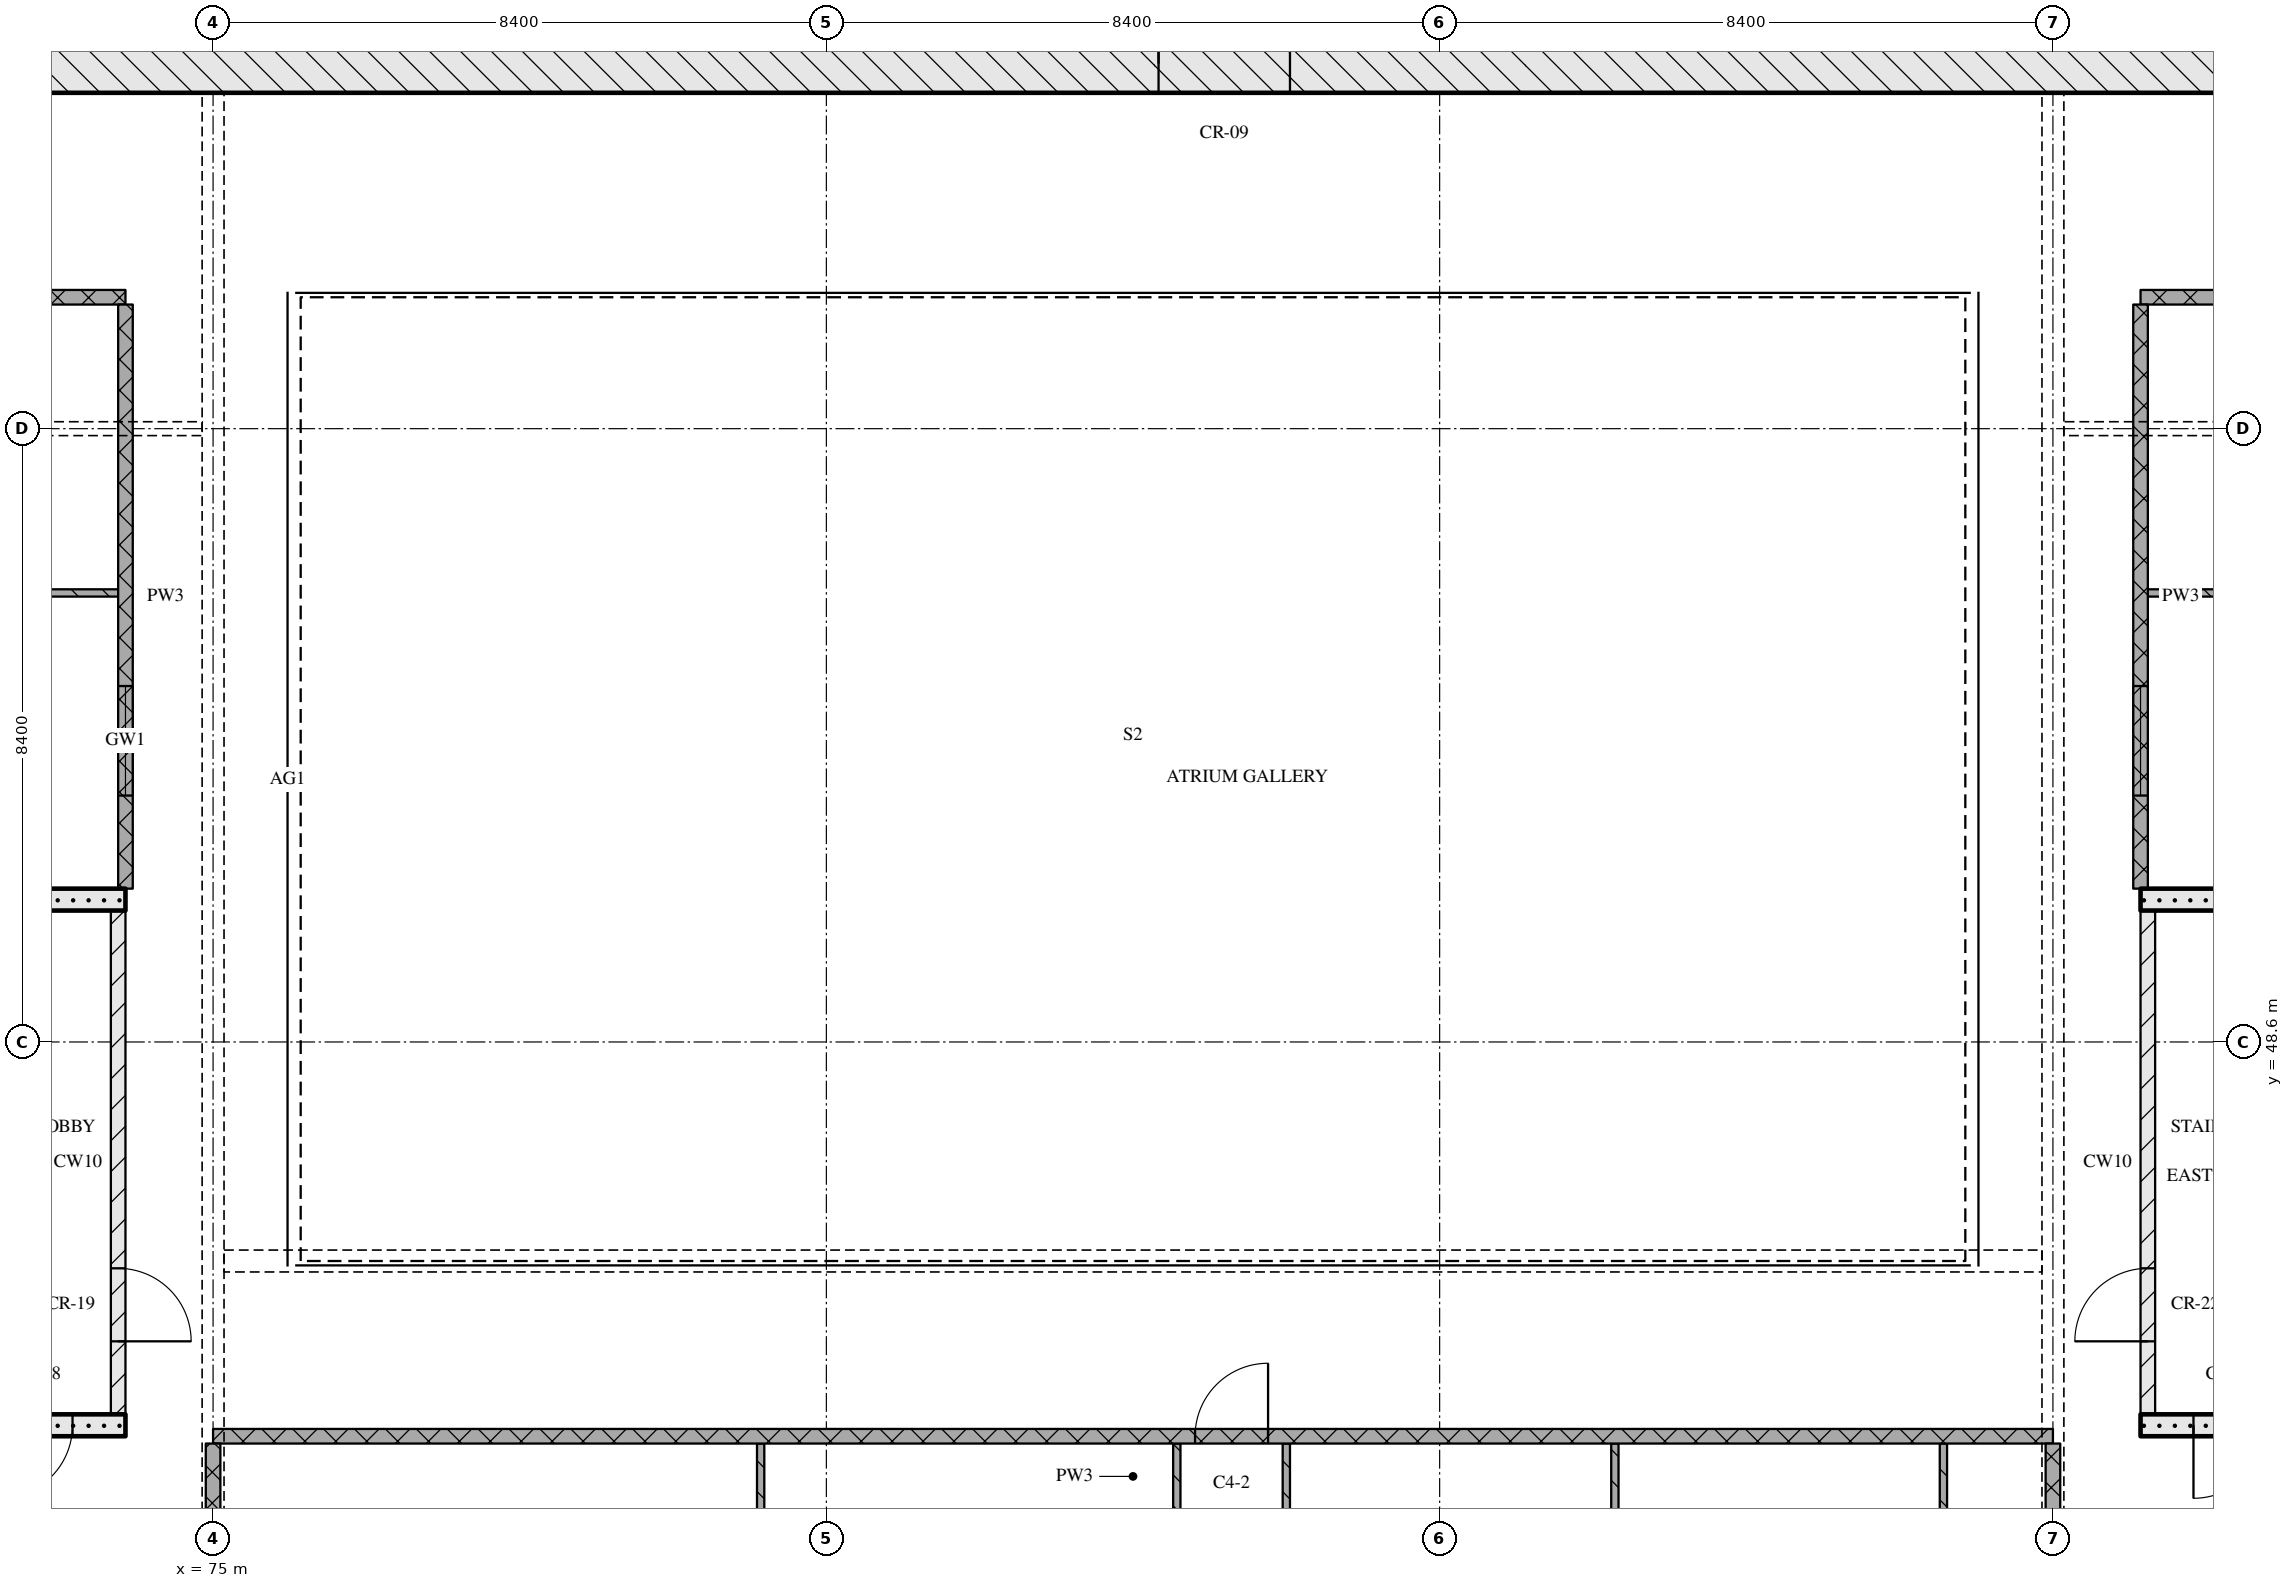
"""IFC4 building model, lengths in metres.
Left out: names, types, materials, properties, quantities, classifications, styles, units other than length and angle.
Written with IfcOpenShell. Run it as: python <this file> out.ifc"""

import sys

from ifc_helpers import new_model, si_unit, direction, frame, frame_2d, origin, place, context, subcontext, project, spatial, rectangle, extrude, element, fill, save


model = new_model("IFC4")
c1 = context("Model", 3, precision=1e-05, world=origin(), true_north=direction((0.0, 1.0)))
c2 = subcontext(c1, "Body", "Model", "MODEL_VIEW")
j1 = project(units=[si_unit("LENGTHUNIT", "METRE"), si_unit("PLANEANGLEUNIT", "RADIAN")], contexts=[c1])
p1 = place(None, origin())
s1 = spatial("IfcSite", under=j1, at=p1, CompositionType="ELEMENT")
p2 = place(p1, origin())
s2 = spatial("IfcBuilding", under=s1, at=p2, CompositionType="ELEMENT")
p3 = place(p2, frame((0.0, 0.0, 187.05)))
s3 = spatial("IfcBuildingStorey", under=s2, at=p3, CompositionType="ELEMENT", Elevation=187.05)
p4 = place(p3, frame((67.0, 62.0, 0.0), z_axis=(0.0, 0.0, 1.0), x_axis=(1.0, 0.0, 0.0)))
e1 = element("IfcWall", 1, at=p4, inside=s3, PredefinedType="SOLIDWALL", context=c2, shape_type="SweptSolid", body=[
    extrude(rectangle(XDim=41.2, YDim=0.8, at=frame_2d((20.6, 0.0))), origin(), (0.0, 0.0, 1.0), 3.32),
])
p5 = place(p4, frame((20.95, 0.0, 0.0)))
e2 = element("IfcOpeningElement", 2, at=p5, cuts=e1, PredefinedType="OPENING", context=c2, shape_type="SweptSolid", body=[
    extrude(rectangle(XDim=1.8, YDim=2.1, at=frame_2d((0.9, 1.05))), frame((0.0, 0.41, 0.0), z_axis=(0.0, -1.0, 0.0), x_axis=(1.0, 0.0, 0.0)), (0.0, 0.0, 1.0), 0.82),
])
p6 = place(p3, frame((68.2, 43.35, 0.0), z_axis=(0.0, 0.0, 1.0), x_axis=(1.0, 0.0, 0.0)))
e3 = element("IfcWall", 3, at=p6, inside=s3, PredefinedType="SOLIDWALL", context=c2, shape_type="SweptSolid", body=[
    extrude(rectangle(XDim=5.6, YDim=0.3, at=frame_2d((2.8, 0.0))), origin(), (0.0, 0.0, 1.0), 3.32),
])
p7 = place(p6, frame((3.875, 0.0, 0.0)))
e4 = element("IfcOpeningElement", 4, at=p7, cuts=e3, PredefinedType="OPENING", context=c2, shape_type="SweptSolid", body=[
    extrude(rectangle(XDim=1.0, YDim=2.1, at=frame_2d((0.5, 1.05))), frame((0.0, 0.16, 0.0), z_axis=(0.0, -1.0, 0.0), x_axis=(1.0, 0.0, 0.0)), (0.0, 0.0, 1.0), 0.32),
])
p8 = place(p3, frame((73.7, 43.5, 0.0), z_axis=(0.0, 0.0, 1.0), x_axis=(0.0, 1.0, 0.0)))
e5 = element("IfcWall", 5, at=p8, inside=s3, PredefinedType="PARTITIONING", context=c2, shape_type="SweptSolid", body=[
    extrude(rectangle(XDim=6.9, YDim=0.2, at=frame_2d((3.45, 0.0))), origin(), (0.0, 0.0, 1.0), 3.32),
])
p9 = place(p8, frame((1.0, 0.0, 0.0)))
e6 = element("IfcOpeningElement", 6, at=p9, cuts=e5, PredefinedType="OPENING", context=c2, shape_type="SweptSolid", body=[
    extrude(rectangle(XDim=1.0, YDim=2.1, at=frame_2d((0.5, 1.05))), frame((0.0, 0.11, 0.0), z_axis=(0.0, -1.0, 0.0), x_axis=(1.0, 0.0, 0.0)), (0.0, 0.0, 1.0), 0.22),
])
p10 = place(p3, frame((68.2, 50.55, 0.0), z_axis=(0.0, 0.0, 1.0), x_axis=(1.0, 0.0, 0.0)))
e7 = element("IfcWall", 7, at=p10, inside=s3, PredefinedType="SOLIDWALL", context=c2, shape_type="SweptSolid", body=[
    extrude(rectangle(XDim=5.6, YDim=0.3, at=frame_2d((2.8, 0.0))), origin(), (0.0, 0.0, 1.0), 3.32),
])
p11 = place(p3, frame((101.4, 43.35, 0.0), z_axis=(0.0, 0.0, 1.0), x_axis=(1.0, 0.0, 0.0)))
e8 = element("IfcWall", 8, at=p11, inside=s3, PredefinedType="SOLIDWALL", context=c2, shape_type="SweptSolid", body=[
    extrude(rectangle(XDim=5.6, YDim=0.3, at=frame_2d((2.8, 0.0))), origin(), (0.0, 0.0, 1.0), 3.32),
])
p12 = place(p11, frame((0.725, 0.0, 0.0)))
e9 = element("IfcOpeningElement", 9, at=p12, cuts=e8, PredefinedType="OPENING", context=c2, shape_type="SweptSolid", body=[
    extrude(rectangle(XDim=1.0, YDim=2.1, at=frame_2d((0.5, 1.05))), frame((0.0, 0.16, 0.0), z_axis=(0.0, -1.0, 0.0), x_axis=(1.0, 0.0, 0.0)), (0.0, 0.0, 1.0), 0.32),
])
p13 = place(p3, frame((101.5, 43.5, 0.0), z_axis=(0.0, 0.0, 1.0), x_axis=(0.0, 1.0, 0.0)))
e10 = element("IfcWall", 10, at=p13, inside=s3, PredefinedType="PARTITIONING", context=c2, shape_type="SweptSolid", body=[
    extrude(rectangle(XDim=6.9, YDim=0.2, at=frame_2d((3.45, 0.0))), origin(), (0.0, 0.0, 1.0), 3.32),
])
p14 = place(p13, frame((1.0, 0.0, 0.0)))
e11 = element("IfcOpeningElement", 11, at=p14, cuts=e10, PredefinedType="OPENING", context=c2, shape_type="SweptSolid", body=[
    extrude(rectangle(XDim=1.0, YDim=2.1, at=frame_2d((0.5, 1.05))), frame((0.0, 0.11, 0.0), z_axis=(0.0, -1.0, 0.0), x_axis=(1.0, 0.0, 0.0)), (0.0, 0.0, 1.0), 0.22),
])
p15 = place(p3, frame((101.4, 50.55, 0.0), z_axis=(0.0, 0.0, 1.0), x_axis=(1.0, 0.0, 0.0)))
e12 = element("IfcWall", 12, at=p15, inside=s3, PredefinedType="SOLIDWALL", context=c2, shape_type="SweptSolid", body=[
    extrude(rectangle(XDim=5.6, YDim=0.3, at=frame_2d((2.8, 0.0))), origin(), (0.0, 0.0, 1.0), 3.32),
])
p16 = place(p3, frame((100.2, 43.2, 0.0), z_axis=(0.0, 0.0, 1.0), x_axis=(-1.0, 0.0, 0.0)))
e13 = element("IfcWall", 13, at=p16, inside=s3, PredefinedType="PARTITIONING", context=c2, shape_type="SweptSolid", body=[
    extrude(rectangle(XDim=25.2, YDim=0.2, at=frame_2d((12.6, 0.0))), origin(), (0.0, 0.0, 1.0), 3.32),
])
p17 = place(p16, frame((10.75, 0.0, 0.0)))
e14 = element("IfcOpeningElement", 14, at=p17, cuts=e13, PredefinedType="OPENING", context=c2, shape_type="SweptSolid", body=[
    extrude(rectangle(XDim=1.0, YDim=2.1, at=frame_2d((0.5, 1.05))), frame((0.0, 0.11, 0.0), z_axis=(0.0, -1.0, 0.0), x_axis=(1.0, 0.0, 0.0)), (0.0, 0.0, 1.0), 0.22),
])
p18 = place(p3, frame((73.7, 54.75, 0.0), z_axis=(0.0, 0.0, 1.0), x_axis=(-1.0, 0.0, 0.0)))
e15 = element("IfcWall", 15, at=p18, inside=s3, PredefinedType="PARTITIONING", context=c2, shape_type="SweptSolid", body=[
    extrude(rectangle(XDim=6.2, YDim=0.1, at=frame_2d((3.1, 0.0))), origin(), (0.0, 0.0, 1.0), 3.32),
])
p19 = place(p18, frame((2.6, 0.0, 0.0)))
e16 = element("IfcOpeningElement", 16, at=p19, cuts=e15, PredefinedType="OPENING", context=c2, shape_type="SweptSolid", body=[
    extrude(rectangle(XDim=0.9, YDim=2.1, at=frame_2d((0.45, 1.05))), frame((0.0, 0.06, 0.0), z_axis=(0.0, -1.0, 0.0), x_axis=(1.0, 0.0, 0.0)), (0.0, 0.0, 1.0), 0.12),
])
p20 = place(p3, frame((101.5, 54.75, 0.0), z_axis=(0.0, 0.0, 1.0), x_axis=(1.0, 0.0, 0.0)))
e17 = element("IfcWall", 17, at=p20, inside=s3, PredefinedType="PARTITIONING", context=c2, shape_type="SweptSolid", body=[
    extrude(rectangle(XDim=6.2, YDim=0.1, at=frame_2d((3.1, 0.0))), origin(), (0.0, 0.0, 1.0), 3.32),
])
p21 = place(p3, frame((63.0, 58.8, 0.0), z_axis=(0.0, 0.0, 1.0), x_axis=(1.0, 0.0, 0.0)))
e18 = element("IfcWall", 18, at=p21, inside=s3, PredefinedType="PARTITIONING", context=c2, shape_type="SweptSolid", body=[
    extrude(rectangle(XDim=10.8, YDim=0.2, at=frame_2d((5.4, 0.0))), origin(), (0.0, 0.0, 1.0), 3.32),
])
p22 = place(p3, frame((112.2, 58.8, 0.0), z_axis=(0.0, 0.0, 1.0), x_axis=(-1.0, 0.0, 0.0)))
e19 = element("IfcWall", 19, at=p22, inside=s3, PredefinedType="PARTITIONING", context=c2, shape_type="SweptSolid", body=[
    extrude(rectangle(XDim=10.8, YDim=0.2, at=frame_2d((5.4, 0.0))), origin(), (0.0, 0.0, 1.0), 3.32),
])
p23 = place(p22, frame((2.85, 0.0, 0.0)))
e20 = element("IfcOpeningElement", 20, at=p23, cuts=e19, PredefinedType="OPENING", context=c2, shape_type="SweptSolid", body=[
    extrude(rectangle(XDim=1.0, YDim=2.1, at=frame_2d((0.5, 1.05))), frame((0.0, 0.11, 0.0), z_axis=(0.0, -1.0, 0.0), x_axis=(1.0, 0.0, 0.0)), (0.0, 0.0, 1.0), 0.22),
])
p24 = place(p3, frame((73.8, 58.7, 0.0), z_axis=(0.0, 0.0, 1.0), x_axis=(0.0, -1.0, 0.0)))
e21 = element("IfcWall", 21, at=p24, inside=s3, PredefinedType="PARTITIONING", context=c2, shape_type="SweptSolid", body=[
    extrude(rectangle(XDim=8.0, YDim=0.2, at=frame_2d((4.0, 0.0))), origin(), (0.0, 0.0, 1.0), 3.32),
])
p25 = place(p24, frame((5.225, 0.0, 0.9)))
e22 = element("IfcOpeningElement", 22, at=p25, cuts=e21, PredefinedType="OPENING", context=c2, shape_type="SweptSolid", body=[
    extrude(rectangle(XDim=1.5, YDim=1.5, at=frame_2d((0.75, 0.75))), frame((0.0, 0.11, 0.0), z_axis=(0.0, -1.0, 0.0), x_axis=(1.0, 0.0, 0.0)), (0.0, 0.0, 1.0), 0.22),
])
p26 = place(p3, frame((75.0, 43.1, 0.0), z_axis=(0.0, 0.0, 1.0), x_axis=(0.0, -1.0, 0.0)))
e23 = element("IfcWall", 23, at=p26, inside=s3, PredefinedType="PARTITIONING", context=c2, shape_type="SweptSolid", body=[
    extrude(rectangle(XDim=2.2, YDim=0.2, at=frame_2d((1.1, 0.0))), origin(), (0.0, 0.0, 1.0), 2.43),
])
p27 = place(p3, frame((82.5, 43.1, 0.0), z_axis=(0.0, 0.0, 1.0), x_axis=(0.0, -1.0, 0.0)))
e24 = element("IfcWall", 24, at=p27, inside=s3, PredefinedType="PARTITIONING", context=c2, shape_type="SweptSolid", body=[
    extrude(rectangle(XDim=4.95, YDim=0.1, at=frame_2d((2.475, 0.0))), origin(), (0.0, 0.0, 1.0), 3.32),
])
p28 = place(p3, frame((88.2, 38.15, 0.0), z_axis=(0.0, 0.0, 1.0), x_axis=(0.0, 1.0, 0.0)))
e25 = element("IfcWall", 25, at=p28, inside=s3, PredefinedType="PARTITIONING", context=c2, shape_type="SweptSolid", body=[
    extrude(rectangle(XDim=4.95, YDim=0.1, at=frame_2d((2.475, 0.0))), origin(), (0.0, 0.0, 1.0), 3.32),
])
p29 = place(p28, frame((2.05, 0.0, 0.0)))
e26 = element("IfcOpeningElement", 26, at=p29, cuts=e25, PredefinedType="OPENING", context=c2, shape_type="SweptSolid", body=[
    extrude(rectangle(XDim=0.9, YDim=2.1, at=frame_2d((0.45, 1.05))), frame((0.0, 0.06, 0.0), z_axis=(0.0, -1.0, 0.0), x_axis=(1.0, 0.0, 0.0)), (0.0, 0.0, 1.0), 0.12),
])
p30 = place(p3, frame((89.7, 43.1, 0.0), z_axis=(0.0, 0.0, 1.0), x_axis=(0.0, -1.0, 0.0)))
e27 = element("IfcWall", 27, at=p30, inside=s3, PredefinedType="PARTITIONING", context=c2, shape_type="SweptSolid", body=[
    extrude(rectangle(XDim=4.95, YDim=0.1, at=frame_2d((2.475, 0.0))), origin(), (0.0, 0.0, 1.0), 3.32),
])
p31 = place(p30, frame((2.05, 0.0, 0.0)))
e28 = element("IfcOpeningElement", 28, at=p31, cuts=e27, PredefinedType="OPENING", context=c2, shape_type="SweptSolid", body=[
    extrude(rectangle(XDim=0.8, YDim=2.1, at=frame_2d((0.4, 1.05))), frame((0.0, 0.06, 0.0), z_axis=(0.0, -1.0, 0.0), x_axis=(1.0, 0.0, 0.0)), (0.0, 0.0, 1.0), 0.12),
])
for number, where, z_axis, x_axis in (
    (29, (94.2, 43.1, 0.0), (0.0, 0.0, 1.0), (0.0, -1.0, 0.0)),
    (30, (98.7, 43.1, 0.0), (0.0, 0.0, 1.0), (0.0, -1.0, 0.0)),
):
    element("IfcWall", number, at=place(p3, frame(where, z_axis=z_axis, x_axis=x_axis)), inside=s3, PredefinedType="PARTITIONING", context=c2, shape_type="SweptSolid", body=[
        extrude(rectangle(XDim=4.95, YDim=0.1, at=frame_2d((2.475, 0.0))), origin(), (0.0, 0.0, 1.0), 3.32),
    ])
p32 = place(p3, frame((100.2, 43.1, 0.0), z_axis=(0.0, 0.0, 1.0), x_axis=(0.0, -1.0, 0.0)))
e31 = element("IfcWall", 31, at=p32, inside=s3, PredefinedType="PARTITIONING", context=c2, shape_type="SweptSolid", body=[
    extrude(rectangle(XDim=2.2, YDim=0.2, at=frame_2d((1.1, 0.0))), origin(), (0.0, 0.0, 1.0), 2.43),
])
p33 = place(p3, frame((101.4, 58.7, 0.0), z_axis=(0.0, 0.0, 1.0), x_axis=(0.0, -1.0, 0.0)))
e32 = element("IfcWall", 32, at=p33, inside=s3, PredefinedType="PARTITIONING", context=c2, shape_type="SweptSolid", body=[
    extrude(rectangle(XDim=8.0, YDim=0.2, at=frame_2d((4.0, 0.0))), origin(), (0.0, 0.0, 1.0), 3.32),
])
p34 = place(p33, frame((5.225, 0.0, 0.9)))
e33 = element("IfcOpeningElement", 33, at=p34, cuts=e32, PredefinedType="OPENING", context=c2, shape_type="SweptSolid", body=[
    extrude(rectangle(XDim=1.5, YDim=1.5, at=frame_2d((0.75, 0.75))), frame((0.0, 0.11, 0.0), z_axis=(0.0, -1.0, 0.0), x_axis=(1.0, 0.0, 0.0)), (0.0, 0.0, 1.0), 0.22),
])
p35 = place(p5, origin())
e34 = element("IfcDoor", 34, at=p35, inside=s3, OperationType="DOUBLE_DOOR_SINGLE_SWING", PredefinedType="DOOR", context=c2, shape_type="SweptSolid", body=[
    extrude(rectangle(XDim=1.8, YDim=2.1, at=frame_2d((0.9, 1.05))), frame((0.0, 0.025, 0.0), z_axis=(0.0, -1.0, 0.0), x_axis=(1.0, 0.0, 0.0)), (0.0, 0.0, 1.0), 0.05),
])
fill(e2, e34)
p36 = place(p7, origin())
e35 = element("IfcDoor", 35, at=p36, inside=s3, OperationType="SINGLE_SWING_RIGHT", PredefinedType="DOOR", context=c2, shape_type="SweptSolid", body=[
    extrude(rectangle(XDim=1.0, YDim=2.1, at=frame_2d((0.5, 1.05))), frame((0.0, 0.025, 0.0), z_axis=(0.0, -1.0, 0.0), x_axis=(1.0, 0.0, 0.0)), (0.0, 0.0, 1.0), 0.05),
])
fill(e4, e35)
p37 = place(p9, origin())
e36 = element("IfcDoor", 36, at=p37, inside=s3, OperationType="SINGLE_SWING_RIGHT", PredefinedType="DOOR", context=c2, shape_type="SweptSolid", body=[
    extrude(rectangle(XDim=1.0, YDim=2.1, at=frame_2d((0.5, 1.05))), frame((0.0, 0.025, 0.0), z_axis=(0.0, -1.0, 0.0), x_axis=(1.0, 0.0, 0.0)), (0.0, 0.0, 1.0), 0.05),
])
fill(e6, e36)
p38 = place(p12, origin())
e37 = element("IfcDoor", 37, at=p38, inside=s3, OperationType="SINGLE_SWING_RIGHT", PredefinedType="DOOR", context=c2, shape_type="SweptSolid", body=[
    extrude(rectangle(XDim=1.0, YDim=2.1, at=frame_2d((0.5, 1.05))), frame((0.0, 0.025, 0.0), z_axis=(0.0, -1.0, 0.0), x_axis=(1.0, 0.0, 0.0)), (0.0, 0.0, 1.0), 0.05),
])
fill(e9, e37)
p39 = place(p14, origin())
e38 = element("IfcDoor", 38, at=p39, inside=s3, OperationType="SINGLE_SWING_LEFT", PredefinedType="DOOR", context=c2, shape_type="SweptSolid", body=[
    extrude(rectangle(XDim=1.0, YDim=2.1, at=frame_2d((0.5, 1.05))), frame((0.0, 0.025, 0.0), z_axis=(0.0, -1.0, 0.0), x_axis=(1.0, 0.0, 0.0)), (0.0, 0.0, 1.0), 0.05),
])
fill(e11, e38)
p40 = place(p17, origin())
e39 = element("IfcDoor", 39, at=p40, inside=s3, OperationType="SINGLE_SWING_RIGHT", PredefinedType="DOOR", context=c2, shape_type="SweptSolid", body=[
    extrude(rectangle(XDim=1.0, YDim=2.1, at=frame_2d((0.5, 1.05))), frame((0.0, 0.025, 0.0), z_axis=(0.0, -1.0, 0.0), x_axis=(1.0, 0.0, 0.0)), (0.0, 0.0, 1.0), 0.05),
])
fill(e14, e39)
p41 = place(p25, origin())
e40 = element("IfcWindow", 40, at=p41, inside=s3, PartitioningType="SINGLE_PANEL", PredefinedType="WINDOW", context=c2, shape_type="SweptSolid", body=[
    extrude(rectangle(XDim=1.5, YDim=1.5, at=frame_2d((0.75, 0.75))), frame((0.0, 0.03, 0.0), z_axis=(0.0, -1.0, 0.0), x_axis=(1.0, 0.0, 0.0)), (0.0, 0.0, 1.0), 0.06),
])
fill(e22, e40)
p42 = place(p34, origin())
e41 = element("IfcWindow", 41, at=p42, inside=s3, PartitioningType="SINGLE_PANEL", PredefinedType="WINDOW", context=c2, shape_type="SweptSolid", body=[
    extrude(rectangle(XDim=1.5, YDim=1.5, at=frame_2d((0.75, 0.75))), frame((0.0, 0.03, 0.0), z_axis=(0.0, -1.0, 0.0), x_axis=(1.0, 0.0, 0.0)), (0.0, 0.0, 1.0), 0.06),
])
fill(e33, e41)
save(model, sys.argv[1])
